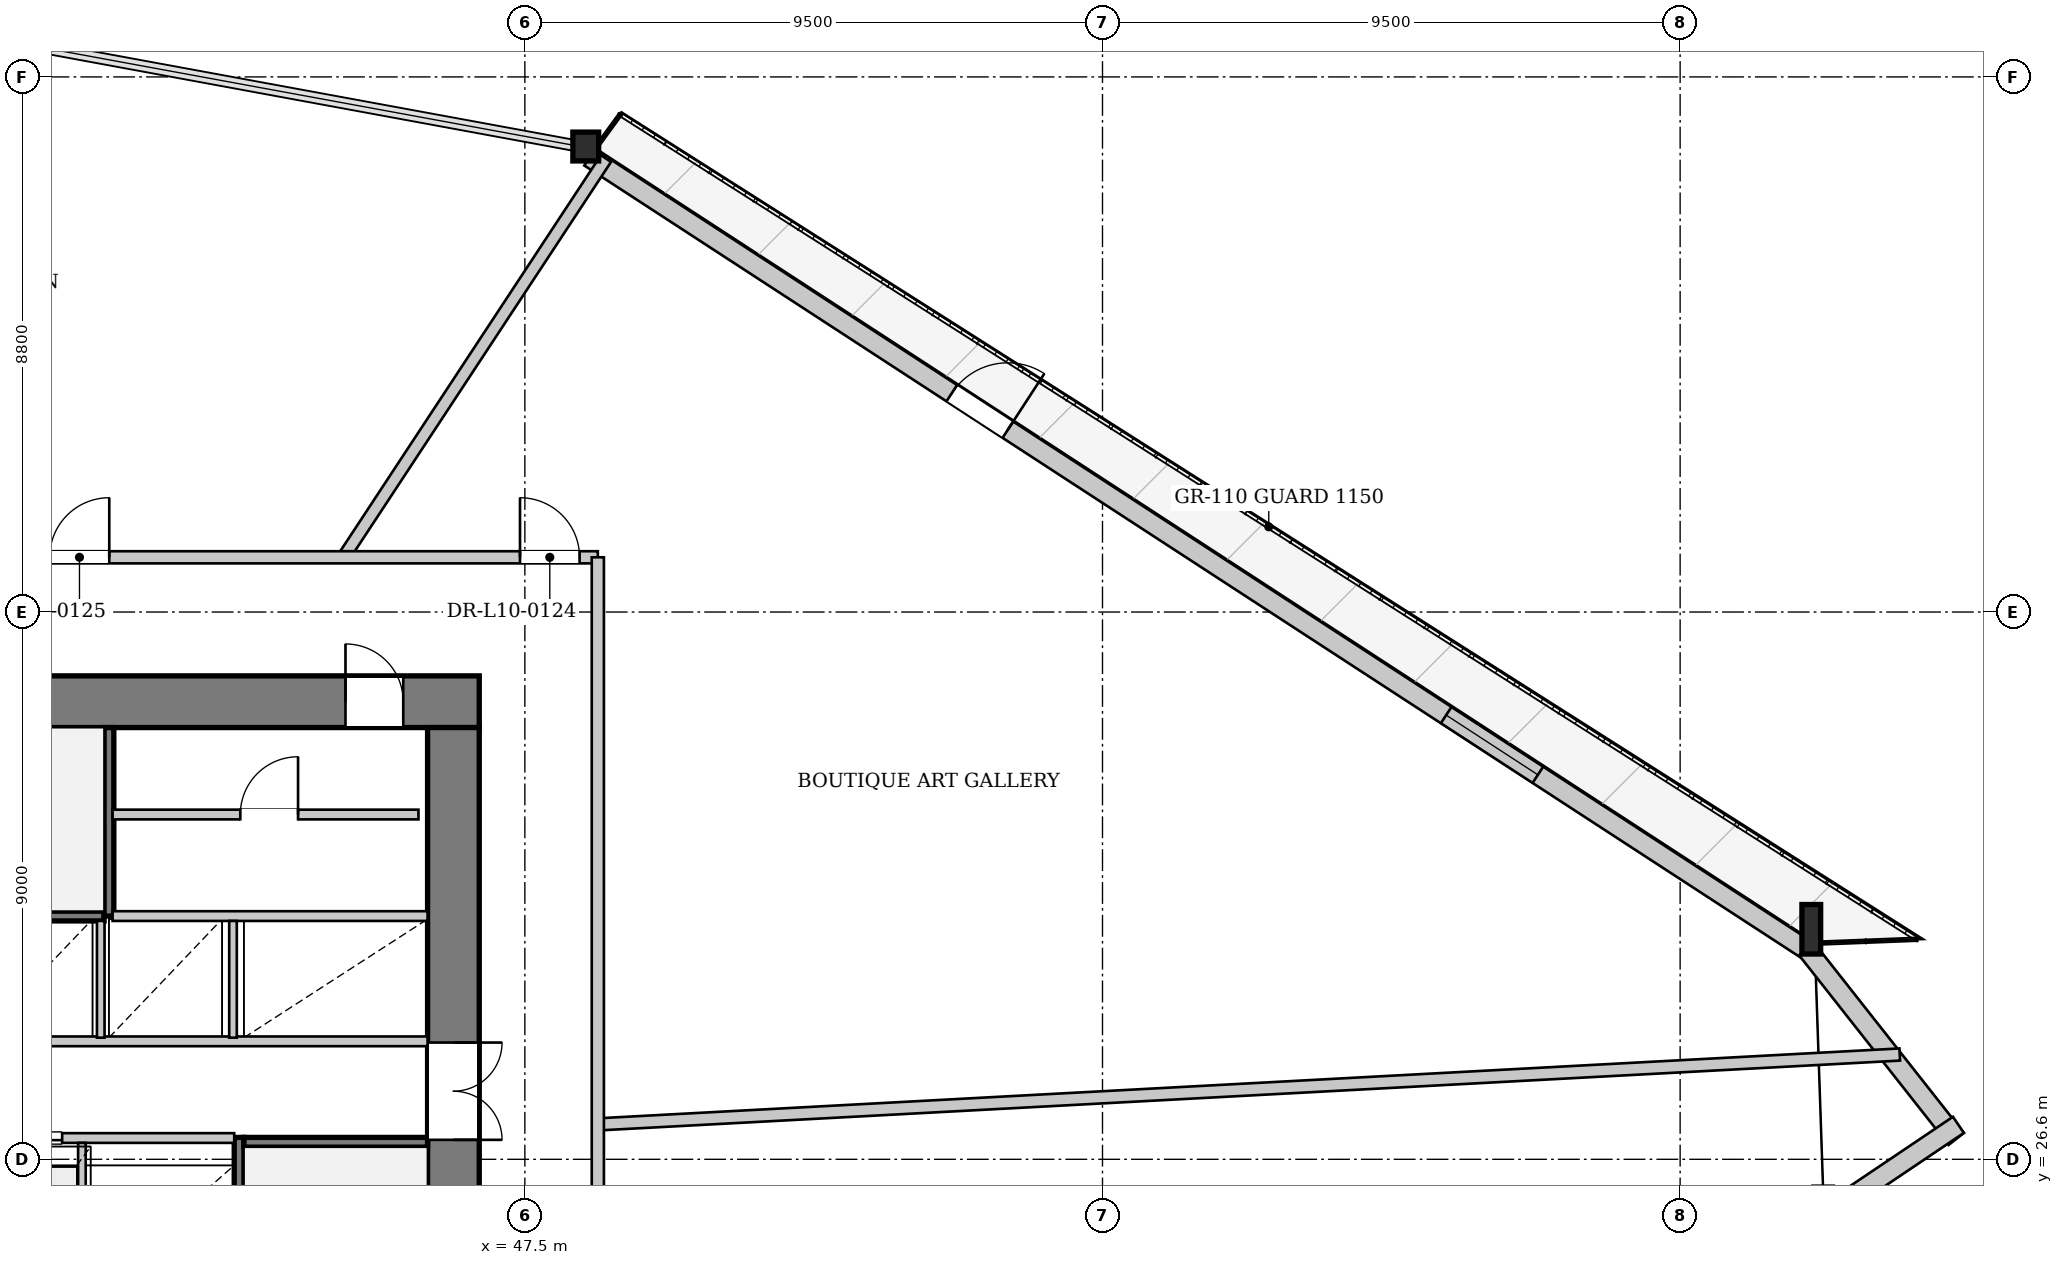
"""IFC4 building model, lengths in metres.
Left out: names, types, materials, properties, quantities, classifications, styles, units other than length and angle.
Written with IfcOpenShell. Run it as: python <this file> out.ifc"""

import sys

from ifc_helpers import new_model, si_unit, direction, frame, frame_2d, origin, origin_2d, place, context, subcontext, project, spatial, rectangle, i_section, extrude, source, transform, mapped, element, fill, save


model = new_model("IFC4")
c1 = context("Model", 3, precision=1e-05, world=origin(), true_north=direction((0.0, 1.0)))
c2 = subcontext(c1, "Body", "Model", "MODEL_VIEW")
j1 = project(units=[si_unit("LENGTHUNIT", "METRE"), si_unit("PLANEANGLEUNIT", "RADIAN")], contexts=[c1])
p1 = place(None, origin())
s1 = spatial("IfcSite", under=j1, at=p1, CompositionType="ELEMENT")
p2 = place(p1, origin())
s2 = spatial("IfcBuilding", under=s1, at=p2, CompositionType="ELEMENT")
p3 = place(p2, frame((0.0, 0.0, 43.5)))
s3 = spatial("IfcBuildingStorey", under=s2, at=p3, CompositionType="ELEMENT", Elevation=43.5)
m1 = source(origin(), c2, "Body", "SweptSolid", [
    extrude(i_section(OverallWidth=0.308, OverallDepth=0.814, WebThickness=0.021, FlangeThickness=0.04, at=origin_2d()), origin(), (0.0, 0.0, 1.0), 3.422),
])
p4 = place(p3, frame((68.867, 25.486, 0.0), z_axis=(-0.009203169224, 0.146537283616, 0.989162335609), x_axis=(-0.998033626119, -0.062680787619, 0.0)))
e1 = element("IfcColumn", 1, at=p4, inside=s3, PredefinedType="COLUMN", context=c2, shape_type="MappedRepresentation", body=[
    mapped(m1, transform((0.0, 0.0, 0.0), x_axis=(1.0, 0.0, 0.0), y_axis=(0.0, 1.0, 0.0), z_axis=(0.0, 0.0, 1.0), scale=1.0)),
])
m2 = source(origin(), c2, "Body", "SweptSolid", [
    extrude(i_section(OverallWidth=0.308, OverallDepth=0.814, WebThickness=0.021, FlangeThickness=0.04, at=origin_2d()), origin(), (0.0, 0.0, 1.0), 3.418),
])
p5 = place(p3, frame((68.708, 30.153, 0.0), z_axis=(-0.030073830661, 0.134653612343, 0.990436252059), x_axis=(-0.975955040673, -0.217971921551, 0.0)))
e2 = element("IfcColumn", 2, at=p5, inside=s3, PredefinedType="COLUMN", context=c2, shape_type="MappedRepresentation", body=[
    mapped(m2, transform((0.0, 0.0, 0.0), x_axis=(1.0, 0.0, 0.0), y_axis=(0.0, 1.0, 0.0), z_axis=(0.0, 0.0, 1.0), scale=1.0)),
])
m3 = source(origin(), c2, "Body", "SweptSolid", [
    extrude(i_section(OverallWidth=0.424, OverallDepth=0.474, WebThickness=0.043, FlangeThickness=0.068, at=origin_2d()), origin(), (0.0, 0.0, 1.0), 3.399),
])
p6 = place(p3, frame((48.652, 43.211, 0.0), z_axis=(-0.088620867342, 0.025925553574, 0.995727978689), x_axis=(-0.280776438027, -0.95977319813, 0.0)))
e3 = element("IfcColumn", 3, at=p6, inside=s3, PredefinedType="COLUMN", context=c2, shape_type="MappedRepresentation", body=[
    mapped(m3, transform((0.0, 0.0, 0.0), x_axis=(1.0, 0.0, 0.0), y_axis=(0.0, 1.0, 0.0), z_axis=(0.0, 0.0, 1.0), scale=1.0)),
])
p7 = place(p3, frame((48.565, 43.077, 0.0), z_axis=(0.0, 0.0, 1.0), x_axis=(0.838026180403, -0.545630022048, 0.0)))
e4 = element("IfcWall", 4, at=p7, inside=s3, PredefinedType="SOLIDWALL", context=c2, shape_type="SweptSolid", body=[
    extrude(rectangle(XDim=23.933, YDim=0.32, at=frame_2d((11.966, 0.0))), origin(), (0.0, 0.0, 1.0), 2.592),
])
p8 = place(p7, frame((7.108, 0.0, 0.0)))
e5 = element("IfcOpeningElement", 5, at=p8, cuts=e4, PredefinedType="OPENING", context=c2, shape_type="SweptSolid", body=[
    extrude(rectangle(XDim=1.1, YDim=2.3, at=frame_2d((0.55, 1.15))), frame((0.0, 0.17, 0.0), z_axis=(0.0, -1.0, 0.0), x_axis=(1.0, 0.0, 0.0)), (0.0, 0.0, 1.0), 0.34),
])
p9 = place(p7, frame((16.81, 0.0, 0.272)))
e6 = element("IfcOpeningElement", 6, at=p9, cuts=e4, PredefinedType="OPENING", context=c2, shape_type="SweptSolid", body=[
    extrude(rectangle(XDim=1.8, YDim=2.2, at=frame_2d((0.9, 1.1))), frame((0.0, 0.17, 0.0), z_axis=(0.0, -1.0, 0.0), x_axis=(1.0, 0.0, 0.0)), (0.0, 0.0, 1.0), 0.34),
])
p10 = place(p3, frame((68.583, 30.054, 0.0), z_axis=(0.0, 0.0, 1.0), x_axis=(0.618904414078, -0.78546631133, 0.0)))
e7 = element("IfcWall", 7, at=p10, inside=s3, PredefinedType="SOLIDWALL", context=c2, shape_type="SweptSolid", body=[
    extrude(rectangle(XDim=3.971, YDim=0.32, at=frame_2d((1.985, 0.0))), origin(), (0.0, 0.0, 1.0), 2.592),
])
p11 = place(p3, frame((71.077, 27.167, 0.0), z_axis=(0.0, 0.0, 1.0), x_axis=(-0.829425264913, -0.558617695678, 0.0)))
e8 = element("IfcWall", 8, at=p11, inside=s3, PredefinedType="SOLIDWALL", context=c2, shape_type="SweptSolid", body=[
    extrude(rectangle(XDim=2.771, YDim=0.32, at=frame_2d((1.386, 0.0))), origin(), (0.0, 0.0, 1.0), 2.592),
])
p12 = place(p3, frame((29.25, 34.125, 0.0), z_axis=(0.0, 0.0, 1.0), x_axis=(1.0, 0.0, 0.0)))
e9 = element("IfcWall", 9, at=p12, inside=s3, PredefinedType="SHEAR", context=c2, shape_type="SweptSolid", body=[
    extrude(rectangle(XDim=17.5, YDim=0.85, at=frame_2d((8.75, 0.0))), origin(), (0.0, 0.0, 1.0), 3.3),
])
p13 = place(p12, frame((1.85, 0.0, 0.0)))
e10 = element("IfcOpeningElement", 10, at=p13, cuts=e9, PredefinedType="OPENING", context=c2, shape_type="SweptSolid", body=[
    extrude(rectangle(XDim=0.95, YDim=2.1, at=frame_2d((0.475, 1.05))), frame((0.0, 0.435, 0.0), z_axis=(0.0, -1.0, 0.0), x_axis=(1.0, 0.0, 0.0)), (0.0, 0.0, 1.0), 0.87),
])
p14 = place(p12, frame((4.23, 0.0, 0.0)))
e11 = element("IfcOpeningElement", 11, at=p14, cuts=e9, PredefinedType="OPENING", context=c2, shape_type="SweptSolid", body=[
    extrude(rectangle(XDim=1.32, YDim=2.2, at=frame_2d((0.66, 1.1))), frame((0.0, 0.435, 0.0), z_axis=(0.0, -1.0, 0.0), x_axis=(1.0, 0.0, 0.0)), (0.0, 0.0, 1.0), 0.87),
])
p15 = place(p12, frame((15.3, 0.0, 0.0)))
e12 = element("IfcOpeningElement", 12, at=p15, cuts=e9, PredefinedType="OPENING", context=c2, shape_type="SweptSolid", body=[
    extrude(rectangle(XDim=0.95, YDim=2.1, at=frame_2d((0.475, 1.05))), frame((0.0, 0.435, 0.0), z_axis=(0.0, -1.0, 0.0), x_axis=(1.0, 0.0, 0.0)), (0.0, 0.0, 1.0), 0.87),
])
p16 = place(p3, frame((46.325, 33.7, 0.0), z_axis=(0.0, 0.0, 1.0), x_axis=(0.0, -1.0, 0.0)))
e13 = element("IfcWall", 13, at=p16, inside=s3, PredefinedType="SHEAR", context=c2, shape_type="SweptSolid", body=[
    extrude(rectangle(XDim=14.2, YDim=0.85, at=frame_2d((7.1, 0.0))), origin(), (0.0, 0.0, 1.0), 3.3),
])
p17 = place(p16, frame((5.18, 0.0, 0.0)))
e14 = element("IfcOpeningElement", 14, at=p17, cuts=e13, PredefinedType="OPENING", context=c2, shape_type="SweptSolid", body=[
    extrude(rectangle(XDim=1.6, YDim=2.2, at=frame_2d((0.8, 1.1))), frame((0.0, 0.435, 0.0), z_axis=(0.0, -1.0, 0.0), x_axis=(1.0, 0.0, 0.0)), (0.0, 0.0, 1.0), 0.87),
])
p18 = place(p3, frame((42.8, 26.96, 0.0), z_axis=(0.0, 0.0, 1.0), x_axis=(0.0, -1.0, 0.0)))
e15 = element("IfcWall", 15, at=p18, inside=s3, PredefinedType="PARTITIONING", context=c2, shape_type="SweptSolid", body=[
    extrude(rectangle(XDim=7.46, YDim=0.16, at=frame_2d((3.73, 0.0))), origin(), (0.0, 0.0, 1.0), 3.3),
])
p19 = place(p18, frame((6.06, 0.0, 0.0)))
e16 = element("IfcOpeningElement", 16, at=p19, cuts=e15, PredefinedType="OPENING", context=c2, shape_type="SweptSolid", body=[
    extrude(rectangle(XDim=1.32, YDim=2.2, at=frame_2d((0.66, 1.1))), frame((0.0, 0.09, 0.0), z_axis=(0.0, -1.0, 0.0), x_axis=(1.0, 0.0, 0.0)), (0.0, 0.0, 1.0), 0.18),
])
p20 = place(p3, frame((42.88, 26.88, 0.0), z_axis=(0.0, 0.0, 1.0), x_axis=(1.0, 0.0, 0.0)))
e17 = element("IfcWall", 17, at=p20, inside=s3, PredefinedType="PARTITIONING", context=c2, shape_type="SweptSolid", body=[
    extrude(rectangle(XDim=3.02, YDim=0.16, at=frame_2d((1.51, 0.0))), origin(), (0.0, 0.0, 1.0), 3.3),
])
p21 = place(p3, frame((33.28, 30.6, 0.0), z_axis=(0.0, 0.0, 1.0), x_axis=(1.0, 0.0, 0.0)))
e18 = element("IfcWall", 18, at=p21, inside=s3, PredefinedType="PARTITIONING", context=c2, shape_type="SweptSolid", body=[
    extrude(rectangle(XDim=7.3, YDim=0.16, at=frame_2d((3.65, 0.0))), origin(), (0.0, 0.0, 1.0), 3.3),
])
p22 = place(p3, frame((40.66, 30.6, 0.0), z_axis=(0.0, 0.0, 1.0), x_axis=(0.0, 1.0, 0.0)))
e19 = element("IfcWall", 19, at=p22, inside=s3, PredefinedType="PARTITIONING", context=c2, shape_type="SweptSolid", body=[
    extrude(rectangle(XDim=3.1, YDim=0.16, at=frame_2d((1.55, 0.0))), origin(), (0.0, 0.0, 1.0), 3.3),
])
p23 = place(p3, frame((33.28, 26.95, 0.0), z_axis=(0.0, 0.0, 1.0), x_axis=(1.0, 0.0, 0.0)))
e20 = element("IfcWall", 20, at=p23, inside=s3, PredefinedType="PARTITIONING", context=c2, shape_type="SweptSolid", body=[
    extrude(rectangle(XDim=9.44, YDim=0.16, at=frame_2d((4.72, 0.0))), origin(), (0.0, 0.0, 1.0), 3.3),
])
p24 = place(p23, frame((0.26, 0.0, 0.0)))
e21 = element("IfcOpeningElement", 21, at=p24, cuts=e20, PredefinedType="OPENING", context=c2, shape_type="SweptSolid", body=[
    extrude(rectangle(XDim=1.1, YDim=2.2, at=frame_2d((0.55, 1.1))), frame((0.0, 0.09, 0.0), z_axis=(0.0, -1.0, 0.0), x_axis=(1.0, 0.0, 0.0)), (0.0, 0.0, 1.0), 0.18),
])
p25 = place(p23, frame((2.01, 0.0, 0.0)))
e22 = element("IfcOpeningElement", 22, at=p25, cuts=e20, PredefinedType="OPENING", context=c2, shape_type="SweptSolid", body=[
    extrude(rectangle(XDim=1.1, YDim=2.2, at=frame_2d((0.55, 1.1))), frame((0.0, 0.09, 0.0), z_axis=(0.0, -1.0, 0.0), x_axis=(1.0, 0.0, 0.0)), (0.0, 0.0, 1.0), 0.18),
])
p26 = place(p23, frame((3.76, 0.0, 0.0)))
e23 = element("IfcOpeningElement", 23, at=p26, cuts=e20, PredefinedType="OPENING", context=c2, shape_type="SweptSolid", body=[
    extrude(rectangle(XDim=1.1, YDim=2.2, at=frame_2d((0.55, 1.1))), frame((0.0, 0.09, 0.0), z_axis=(0.0, -1.0, 0.0), x_axis=(1.0, 0.0, 0.0)), (0.0, 0.0, 1.0), 0.18),
])
p27 = place(p23, frame((5.51, 0.0, 0.0)))
e24 = element("IfcOpeningElement", 24, at=p27, cuts=e20, PredefinedType="OPENING", context=c2, shape_type="SweptSolid", body=[
    extrude(rectangle(XDim=1.1, YDim=2.2, at=frame_2d((0.55, 1.1))), frame((0.0, 0.09, 0.0), z_axis=(0.0, -1.0, 0.0), x_axis=(1.0, 0.0, 0.0)), (0.0, 0.0, 1.0), 0.18),
])
p28 = place(p3, frame((40.215, 24.56, 0.0), z_axis=(0.0, 0.0, 1.0), x_axis=(0.0, 1.0, 0.0)))
e25 = element("IfcWall", 25, at=p28, inside=s3, PredefinedType="PARTITIONING", context=c2, shape_type="SweptSolid", body=[
    extrude(rectangle(XDim=2.31, YDim=0.125, at=frame_2d((1.155, 0.0))), origin(), (0.0, 0.0, 1.0), 3.3),
])
p29 = place(p3, frame((33.28, 28.54, 0.0), z_axis=(0.0, 0.0, 1.0), x_axis=(1.0, 0.0, 0.0)))
e26 = element("IfcWall", 26, at=p29, inside=s3, PredefinedType="PARTITIONING", context=c2, shape_type="SweptSolid", body=[
    extrude(rectangle(XDim=12.62, YDim=0.16, at=frame_2d((6.31, 0.0))), origin(), (0.0, 0.0, 1.0), 3.3),
])
p30 = place(p3, frame((40.72, 30.6, 0.0), z_axis=(0.0, 0.0, 1.0), x_axis=(1.0, 0.0, 0.0)))
e27 = element("IfcWall", 27, at=p30, inside=s3, PredefinedType="PARTITIONING", context=c2, shape_type="SweptSolid", body=[
    extrude(rectangle(XDim=5.18, YDim=0.16, at=frame_2d((2.59, 0.0))), origin(), (0.0, 0.0, 1.0), 3.3),
])
for number, where, z_axis, x_axis in (
    (28, (40.525, 28.6, 0.0), (0.0, 0.0, 1.0), (0.0, 1.0, 0.0)),
    (29, (42.7, 28.6, 0.0), (0.0, 0.0, 1.0), (0.0, 1.0, 0.0)),
):
    element("IfcWall", number, at=place(p3, frame(where, z_axis=z_axis, x_axis=x_axis)), inside=s3, PredefinedType="PARTITIONING", context=c2, shape_type="SweptSolid", body=[
        extrude(rectangle(XDim=1.92, YDim=0.125, at=frame_2d((0.96, 0.0))), origin(), (0.0, 0.0, 1.0), 3.3),
    ])
p31 = place(p3, frame((40.72, 32.27, 0.0), z_axis=(0.0, 0.0, 1.0), x_axis=(1.0, 0.0, 0.0)))
e30 = element("IfcWall", 30, at=p31, inside=s3, PredefinedType="PARTITIONING", context=c2, shape_type="SweptSolid", body=[
    extrude(rectangle(XDim=5.03, YDim=0.16, at=frame_2d((2.515, 0.0))), origin(), (0.0, 0.0, 1.0), 3.3),
])
p32 = place(p31, frame((2.1, 0.0, 0.0)))
e31 = element("IfcOpeningElement", 31, at=p32, cuts=e30, PredefinedType="OPENING", context=c2, shape_type="SweptSolid", body=[
    extrude(rectangle(XDim=0.95, YDim=2.1, at=frame_2d((0.475, 1.05))), frame((0.0, 0.09, 0.0), z_axis=(0.0, -1.0, 0.0), x_axis=(1.0, 0.0, 0.0)), (0.0, 0.0, 1.0), 0.18),
])
p33 = place(p3, frame((48.7, 27.174, 0.0), z_axis=(0.0, 0.0, 1.0), x_axis=(0.998563490956, 0.053581288992, 0.0)))
e32 = element("IfcWall", 32, at=p33, inside=s3, PredefinedType="PARTITIONING", context=c2, shape_type="SweptSolid", body=[
    extrude(rectangle(XDim=21.443, YDim=0.2, at=frame_2d((10.721, 0.0))), origin(), (0.0, 0.0, 1.0), 2.795),
])
p34 = place(p3, frame((44.517, 36.5, 0.0), z_axis=(0.0, 0.0, 1.0), x_axis=(0.549868353799, 0.835251335521, 0.0)))
e33 = element("IfcWall", 33, at=p34, inside=s3, PredefinedType="PARTITIONING", context=c2, shape_type="SweptSolid", body=[
    extrude(rectangle(XDim=7.851, YDim=0.2, at=frame_2d((3.925, 0.0))), origin(), (0.0, 0.0, 1.0), 3.3),
])
p35 = place(p3, frame((27.3, 36.5, 0.0), z_axis=(0.0, 0.0, 1.0), x_axis=(1.0, 0.0, 0.0)))
e34 = element("IfcWall", 34, at=p35, inside=s3, PredefinedType="PARTITIONING", context=c2, shape_type="SweptSolid", body=[
    extrude(rectangle(XDim=21.4, YDim=0.2, at=frame_2d((10.7, 0.0))), origin(), (0.0, 0.0, 1.0), 3.3),
])
p36 = place(p35, frame((20.12, 0.0, 0.0)))
e35 = element("IfcOpeningElement", 35, at=p36, cuts=e34, PredefinedType="OPENING", context=c2, shape_type="SweptSolid", body=[
    extrude(rectangle(XDim=0.98, YDim=2.15, at=frame_2d((0.49, 1.075))), frame((0.0, 0.11, 0.0), z_axis=(0.0, -1.0, 0.0), x_axis=(1.0, 0.0, 0.0)), (0.0, 0.0, 1.0), 0.22),
])
p37 = place(p35, frame((12.385, 0.0, 0.0)))
e36 = element("IfcOpeningElement", 36, at=p37, cuts=e34, PredefinedType="OPENING", context=c2, shape_type="SweptSolid", body=[
    extrude(rectangle(XDim=0.98, YDim=2.15, at=frame_2d((0.49, 1.075))), frame((0.0, 0.11, 0.0), z_axis=(0.0, -1.0, 0.0), x_axis=(1.0, 0.0, 0.0)), (0.0, 0.0, 1.0), 0.22),
])
p38 = place(p3, frame((48.7, 16.7, 0.0), z_axis=(0.0, 0.0, 1.0), x_axis=(0.0, 1.0, 0.0)))
e37 = element("IfcWall", 37, at=p38, inside=s3, PredefinedType="PARTITIONING", context=c2, shape_type="SweptSolid", body=[
    extrude(rectangle(XDim=19.8, YDim=0.2, at=frame_2d((9.9, 0.0))), origin(), (0.0, 0.0, 1.0), 3.3),
])
m4 = source(origin(), c2, "Body", "SweptSolid", [
    extrude(rectangle(XDim=1.1, YDim=2.3, at=frame_2d((0.55, 1.15))), frame((0.0, 0.025, 0.0), z_axis=(0.0, -1.0, 0.0), x_axis=(1.0, 0.0, 0.0)), (0.0, 0.0, 1.0), 0.05),
])
p39 = place(p8, origin())
e38 = element("IfcDoor", 38, at=p39, inside=s3, OperationType="SINGLE_SWING_RIGHT", PredefinedType="DOOR", context=c2, shape_type="MappedRepresentation", body=[
    mapped(m4, transform((0.0, 0.0, 0.0), x_axis=(1.0, 0.0, 0.0), y_axis=(0.0, 1.0, 0.0), z_axis=(0.0, 0.0, 1.0), scale=1.0)),
])
fill(e5, e38)
m5 = source(origin(), c2, "Body", "SweptSolid", [
    extrude(rectangle(XDim=1.8, YDim=2.2, at=frame_2d((0.9, 1.1))), frame((0.0, 0.03, 0.0), z_axis=(0.0, -1.0, 0.0), x_axis=(1.0, 0.0, 0.0)), (0.0, 0.0, 1.0), 0.06),
])
p40 = place(p9, origin())
e39 = element("IfcWindow", 39, at=p40, inside=s3, PartitioningType="SINGLE_PANEL", PredefinedType="WINDOW", context=c2, shape_type="MappedRepresentation", body=[
    mapped(m5, transform((0.0, 0.0, 0.0), x_axis=(1.0, 0.0, 0.0), y_axis=(0.0, 1.0, 0.0), z_axis=(0.0, 0.0, 1.0), scale=1.0)),
])
fill(e6, e39)
m6 = source(origin(), c2, "Body", "SweptSolid", [
    extrude(rectangle(XDim=1.6, YDim=2.2, at=frame_2d((0.8, 1.1))), frame((0.0, 0.025, 0.0), z_axis=(0.0, -1.0, 0.0), x_axis=(1.0, 0.0, 0.0)), (0.0, 0.0, 1.0), 0.05),
])
p41 = place(p17, origin())
e40 = element("IfcDoor", 40, at=p41, inside=s3, OperationType="DOUBLE_DOOR_SINGLE_SWING", PredefinedType="DOOR", context=c2, shape_type="MappedRepresentation", body=[
    mapped(m6, transform((0.0, 0.0, 0.0), x_axis=(1.0, 0.0, 0.0), y_axis=(0.0, 1.0, 0.0), z_axis=(0.0, 0.0, 1.0), scale=1.0)),
])
fill(e14, e40)
m7 = source(origin(), c2, "Body", "SweptSolid", [
    extrude(rectangle(XDim=1.1, YDim=2.2, at=frame_2d((0.55, 1.1))), frame((0.0, 0.025, 0.0), z_axis=(0.0, -1.0, 0.0), x_axis=(1.0, 0.0, 0.0)), (0.0, 0.0, 1.0), 0.05),
])
p42 = place(p27, origin())
e41 = element("IfcDoor", 41, at=p42, inside=s3, OperationType="DOUBLE_DOOR_SLIDING", PredefinedType="DOOR", context=c2, shape_type="MappedRepresentation", body=[
    mapped(m7, transform((0.0, 0.0, 0.0), x_axis=(1.0, 0.0, 0.0), y_axis=(0.0, 1.0, 0.0), z_axis=(0.0, 0.0, 1.0), scale=1.0)),
])
fill(e24, e41)
m8 = source(origin(), c2, "Body", "SweptSolid", [
    extrude(rectangle(XDim=0.95, YDim=2.1, at=frame_2d((0.475, 1.05))), frame((0.0, 0.025, 0.0), z_axis=(0.0, -1.0, 0.0), x_axis=(1.0, 0.0, 0.0)), (0.0, 0.0, 1.0), 0.05),
])
p43 = place(p32, origin())
e42 = element("IfcDoor", 42, at=p43, inside=s3, OperationType="SINGLE_SWING_RIGHT", PredefinedType="DOOR", context=c2, shape_type="MappedRepresentation", body=[
    mapped(m8, transform((0.0, 0.0, 0.0), x_axis=(1.0, 0.0, 0.0), y_axis=(0.0, 1.0, 0.0), z_axis=(0.0, 0.0, 1.0), scale=1.0)),
])
fill(e31, e42)
p44 = place(p15, origin())
e43 = element("IfcDoor", 43, at=p44, inside=s3, OperationType="SINGLE_SWING_LEFT", PredefinedType="DOOR", context=c2, shape_type="MappedRepresentation", body=[
    mapped(m8, transform((0.0, 0.0, 0.0), x_axis=(1.0, 0.0, 0.0), y_axis=(0.0, 1.0, 0.0), z_axis=(0.0, 0.0, 1.0), scale=1.0)),
])
fill(e12, e43)
m9 = source(origin(), c2, "Body", "SweptSolid", [
    extrude(rectangle(XDim=0.98, YDim=2.15, at=frame_2d((0.49, 1.075))), frame((0.0, 0.025, 0.0), z_axis=(0.0, -1.0, 0.0), x_axis=(1.0, 0.0, 0.0)), (0.0, 0.0, 1.0), 0.05),
])
p45 = place(p36, origin())
e44 = element("IfcDoor", 44, at=p45, inside=s3, OperationType="SINGLE_SWING_LEFT", PredefinedType="DOOR", context=c2, shape_type="MappedRepresentation", body=[
    mapped(m9, transform((0.0, 0.0, 0.0), x_axis=(1.0, 0.0, 0.0), y_axis=(0.0, 1.0, 0.0), z_axis=(0.0, 0.0, 1.0), scale=1.0)),
])
fill(e35, e44)
p46 = place(p37, origin())
e45 = element("IfcDoor", 45, at=p46, inside=s3, OperationType="SINGLE_SWING_RIGHT", PredefinedType="DOOR", context=c2, shape_type="MappedRepresentation", body=[
    mapped(m9, transform((0.0, 0.0, 0.0), x_axis=(1.0, 0.0, 0.0), y_axis=(0.0, 1.0, 0.0), z_axis=(0.0, 0.0, 1.0), scale=1.0)),
])
fill(e36, e45)
save(model, sys.argv[1])
